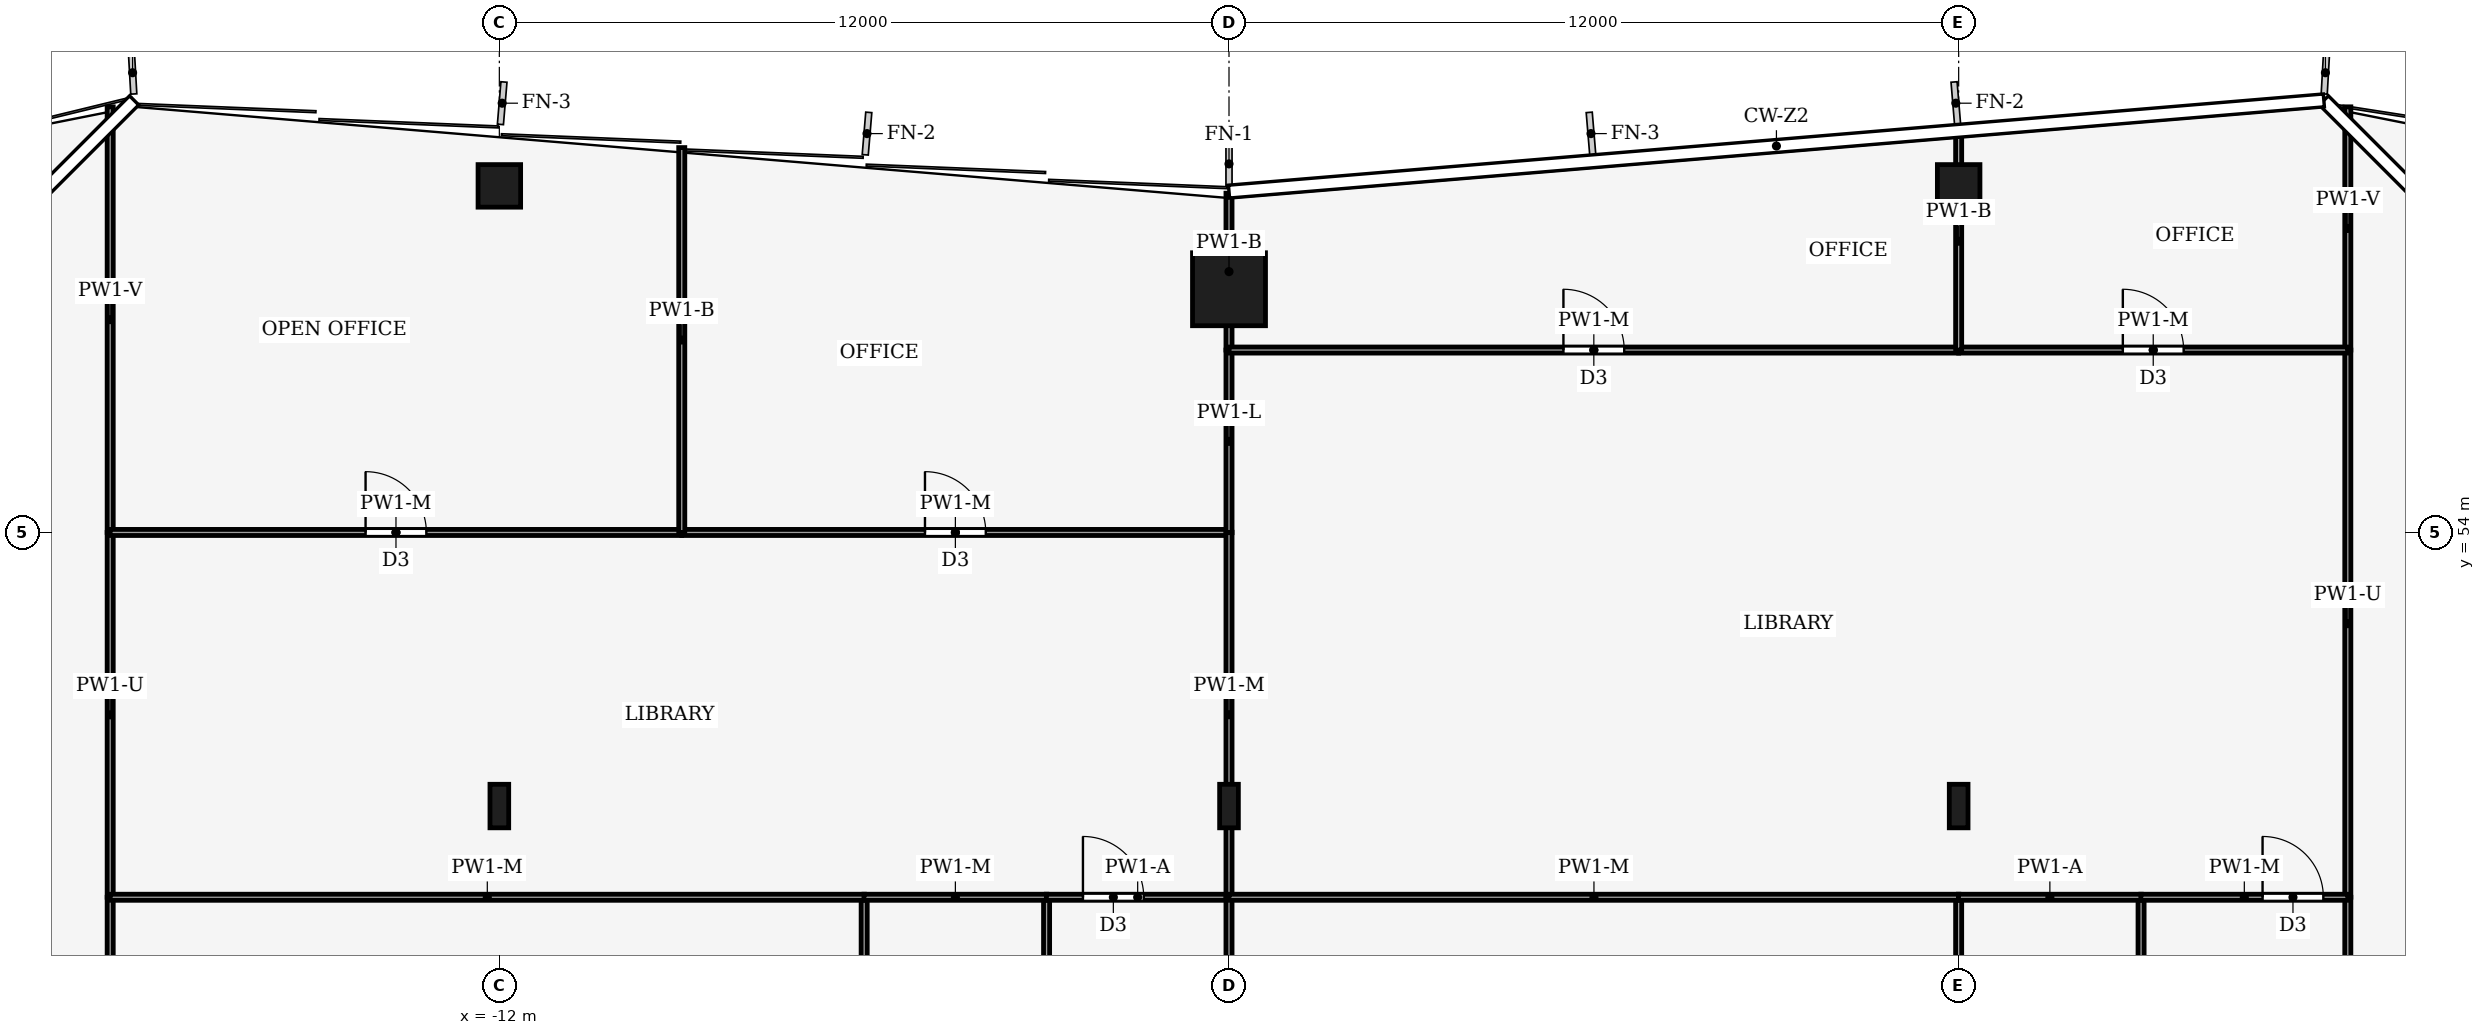
"""IFC4 building model, lengths in metres.
Left out: names, types, materials, properties, quantities, classifications, styles, units other than length and angle.
Written with IfcOpenShell. Run it as: python <this file> out.ifc"""

import sys

from ifc_helpers import new_model, si_unit, direction, frame, frame_2d, origin, origin_2d, place, context, subcontext, project, spatial, rectangle, hollow_rectangle, i_section, extrude, element, fill, save


model = new_model("IFC4")
c1 = context("Model", 3, precision=1e-05, world=origin(), true_north=direction((0.0, 1.0)))
c2 = subcontext(c1, "Body", "Model", "MODEL_VIEW")
j1 = project(units=[si_unit("LENGTHUNIT", "METRE"), si_unit("PLANEANGLEUNIT", "RADIAN")], contexts=[c1])
p1 = place(None, origin())
s1 = spatial("IfcSite", under=j1, at=p1, CompositionType="ELEMENT")
p2 = place(p1, origin())
s2 = spatial("IfcBuilding", under=s1, at=p2, CompositionType="ELEMENT")
p3 = place(p2, frame((0.0, 0.0, 121.0)))
s3 = spatial("IfcBuildingStorey", under=s2, at=p3, CompositionType="ELEMENT", Elevation=121.0)
p4 = place(p3, frame((0.0, 58.0, 0.0), z_axis=(0.0, 0.0, 1.0), x_axis=(1.0, 0.0, 0.0)))
e1 = element("IfcColumn", 1, at=p4, inside=s3, PredefinedType="COLUMN", context=c2, shape_type="SweptSolid", body=[
    extrude(hollow_rectangle(XDim=1.2, YDim=1.2, WallThickness=0.07, at=origin_2d()), origin(), (0.0, 0.0, 1.0), 5.0),
])
for number, where, z_axis, x_axis in (
    (2, (-12.0, 59.7, 0.0), (0.0, 0.0, 1.0), (1.0, 0.0, 0.0)),
    (3, (12.0, 59.7, 0.0), (0.0, 0.0, 1.0), (1.0, 0.0, 0.0)),
):
    element("IfcColumn", number, at=place(p3, frame(where, z_axis=z_axis, x_axis=x_axis)), inside=s3, PredefinedType="COLUMN", context=c2, shape_type="SweptSolid", body=[
        extrude(hollow_rectangle(XDim=0.7, YDim=0.7, WallThickness=0.03, at=origin_2d()), origin(), (0.0, 0.0, 1.0), 5.0),
    ])
for number, where, z_axis, x_axis in (
    (4, (-12.0, 49.5, 0.0), (0.0, 0.0, 1.0), (1.0, 0.0, 0.0)),
    (5, (0.0, 49.5, 0.0), (0.0, 0.0, 1.0), (1.0, 0.0, 0.0)),
    (6, (12.0, 49.5, 0.0), (0.0, 0.0, 1.0), (1.0, 0.0, 0.0)),
):
    element("IfcColumn", number, at=place(p3, frame(where, z_axis=z_axis, x_axis=x_axis)), inside=s3, PredefinedType="COLUMN", context=c2, shape_type="SweptSolid", body=[
        extrude(i_section(OverallWidth=0.308, OverallDepth=0.716, WebThickness=0.021, FlangeThickness=0.04, FilletRadius=0.027, at=origin_2d()), origin(), (0.0, 0.0, 1.0), 5.0),
    ])
p5 = place(p3, frame((-18.4, 43.4, 0.0), z_axis=(0.0, 0.0, 1.0), x_axis=(0.0, 1.0, 0.0)))
e7 = element("IfcWall", 7, at=p5, inside=s3, PredefinedType="PARTITIONING", context=c2, shape_type="SweptSolid", body=[
    extrude(rectangle(XDim=4.6, YDim=0.1, at=frame_2d((2.3, 0.0))), origin(), (0.0, 0.0, 1.0), 4.87),
])
p6 = place(p3, frame((-18.4, 48.0, 0.0), z_axis=(0.0, 0.0, 1.0), x_axis=(0.0, 1.0, 0.0)))
e8 = element("IfcWall", 8, at=p6, inside=s3, PredefinedType="PARTITIONING", context=c2, shape_type="SweptSolid", body=[
    extrude(rectangle(XDim=6.0, YDim=0.1, at=frame_2d((3.0, 0.0))), origin(), (0.0, 0.0, 1.0), 4.24),
])
p7 = place(p3, frame((-18.4, 54.0, 0.0), z_axis=(0.0, 0.0, 1.0), x_axis=(0.0, 1.0, 0.0)))
e9 = element("IfcWall", 9, at=p7, inside=s3, PredefinedType="PARTITIONING", context=c2, shape_type="SweptSolid", body=[
    extrude(rectangle(XDim=7.0, YDim=0.1, at=frame_2d((3.5, 0.0))), origin(), (0.0, 0.0, 1.0), 3.93),
])
p8 = place(p3, frame((18.4, 48.0, 0.0), z_axis=(0.0, 0.0, 1.0), x_axis=(0.0, -1.0, 0.0)))
e10 = element("IfcWall", 10, at=p8, inside=s3, PredefinedType="PARTITIONING", context=c2, shape_type="SweptSolid", body=[
    extrude(rectangle(XDim=4.6, YDim=0.1, at=frame_2d((2.3, 0.0))), origin(), (0.0, 0.0, 1.0), 4.87),
])
p9 = place(p3, frame((18.4, 57.0, 0.0), z_axis=(0.0, 0.0, 1.0), x_axis=(0.0, -1.0, 0.0)))
e11 = element("IfcWall", 11, at=p9, inside=s3, PredefinedType="PARTITIONING", context=c2, shape_type="SweptSolid", body=[
    extrude(rectangle(XDim=9.0, YDim=0.1, at=frame_2d((4.5, 0.0))), origin(), (0.0, 0.0, 1.0), 4.24),
])
p10 = place(p3, frame((18.4, 61.0, 0.0), z_axis=(0.0, 0.0, 1.0), x_axis=(0.0, -1.0, 0.0)))
e12 = element("IfcWall", 12, at=p10, inside=s3, PredefinedType="PARTITIONING", context=c2, shape_type="SweptSolid", body=[
    extrude(rectangle(XDim=4.0, YDim=0.1, at=frame_2d((2.0, 0.0))), origin(), (0.0, 0.0, 1.0), 3.93),
])
p11 = place(p3, frame((-6.0, 43.4, 0.0), z_axis=(0.0, 0.0, 1.0), x_axis=(0.0, 1.0, 0.0)))
e13 = element("IfcWall", 13, at=p11, inside=s3, PredefinedType="PARTITIONING", context=c2, shape_type="SweptSolid", body=[
    extrude(rectangle(XDim=4.6, YDim=0.1, at=frame_2d((2.3, 0.0))), origin(), (0.0, 0.0, 1.0), 4.87),
])
p12 = place(p3, frame((-5.996, 48.0, 0.0), z_axis=(0.0, 0.0, 1.0), x_axis=(-1.0, 0.0, 0.0)))
e14 = element("IfcWall", 14, at=p12, inside=s3, PredefinedType="PARTITIONING", context=c2, shape_type="SweptSolid", body=[
    extrude(rectangle(XDim=12.404, YDim=0.1, at=frame_2d((6.202, 0.0))), origin(), (0.0, 0.0, 1.0), 4.44),
])
p13 = place(p3, frame((-3.0, 43.4, 0.0), z_axis=(0.0, 0.0, 1.0), x_axis=(0.0, 1.0, 0.0)))
e15 = element("IfcWall", 15, at=p13, inside=s3, PredefinedType="PARTITIONING", context=c2, shape_type="SweptSolid", body=[
    extrude(rectangle(XDim=4.6, YDim=0.1, at=frame_2d((2.3, 0.0))), origin(), (0.0, 0.0, 1.0), 4.87),
])
p14 = place(p13, frame((2.2, 0.0, 0.0)))
e16 = element("IfcOpeningElement", 16, at=p14, cuts=e15, PredefinedType="OPENING", context=c2, shape_type="SweptSolid", body=[
    extrude(rectangle(XDim=1.0, YDim=2.1, at=frame_2d((0.5, 1.05))), frame((0.0, 0.06, 0.0), z_axis=(0.0, -1.0, 0.0), x_axis=(1.0, 0.0, 0.0)), (0.0, 0.0, 1.0), 0.12),
])
p15 = place(p3, frame((-2.996, 48.0, 0.0), z_axis=(0.0, 0.0, 1.0), x_axis=(-1.0, 0.0, 0.0)))
e17 = element("IfcWall", 17, at=p15, inside=s3, PredefinedType="PARTITIONING", context=c2, shape_type="SweptSolid", body=[
    extrude(rectangle(XDim=3.008, YDim=0.1, at=frame_2d((1.504, 0.0))), origin(), (0.0, 0.0, 1.0), 4.44),
])
p16 = place(p3, frame((-3.004, 48.0, 0.0), z_axis=(0.0, 0.0, 1.0), x_axis=(1.0, 0.0, 0.0)))
e18 = element("IfcWall", 18, at=p16, inside=s3, PredefinedType="PARTITIONING", context=c2, shape_type="SweptSolid", body=[
    extrude(rectangle(XDim=3.004, YDim=0.1, at=frame_2d((1.502, 0.0))), origin(), (0.0, 0.0, 1.0), 4.87),
])
p17 = place(p16, frame((0.602, 0.0, 0.0)))
e19 = element("IfcOpeningElement", 19, at=p17, cuts=e18, PredefinedType="OPENING", context=c2, shape_type="SweptSolid", body=[
    extrude(rectangle(XDim=1.0, YDim=2.1, at=frame_2d((0.5, 1.05))), frame((0.0, 0.06, 0.0), z_axis=(0.0, -1.0, 0.0), x_axis=(1.0, 0.0, 0.0)), (0.0, 0.0, 1.0), 0.12),
])
p18 = place(p3, frame((0.0, 43.4, 0.0), z_axis=(0.0, 0.0, 1.0), x_axis=(0.0, 1.0, 0.0)))
e20 = element("IfcWall", 20, at=p18, inside=s3, PredefinedType="PARTITIONING", context=c2, shape_type="SweptSolid", body=[
    extrude(rectangle(XDim=4.6, YDim=0.1, at=frame_2d((2.3, 0.0))), origin(), (0.0, 0.0, 1.0), 4.44),
])
p19 = place(p3, frame((-18.4, 54.0, 0.0), z_axis=(0.0, 0.0, 1.0), x_axis=(1.0, 0.0, 0.0)))
e21 = element("IfcWall", 21, at=p19, inside=s3, PredefinedType="PARTITIONING", context=c2, shape_type="SweptSolid", body=[
    extrude(rectangle(XDim=9.4, YDim=0.1, at=frame_2d((4.7, 0.0))), origin(), (0.0, 0.0, 1.0), 4.44),
])
p20 = place(p19, frame((4.2, 0.0, 0.0)))
e22 = element("IfcOpeningElement", 22, at=p20, cuts=e21, PredefinedType="OPENING", context=c2, shape_type="SweptSolid", body=[
    extrude(rectangle(XDim=1.0, YDim=2.1, at=frame_2d((0.5, 1.05))), frame((0.0, 0.06, 0.0), z_axis=(0.0, -1.0, 0.0), x_axis=(1.0, 0.0, 0.0)), (0.0, 0.0, 1.0), 0.12),
])
p21 = place(p3, frame((-9.0, 54.0, 0.0), z_axis=(0.0, 0.0, 1.0), x_axis=(1.0, 0.0, 0.0)))
e23 = element("IfcWall", 23, at=p21, inside=s3, PredefinedType="PARTITIONING", context=c2, shape_type="SweptSolid", body=[
    extrude(rectangle(XDim=9.0, YDim=0.1, at=frame_2d((4.5, 0.0))), origin(), (0.0, 0.0, 1.0), 4.44),
])
p22 = place(p21, frame((4.0, 0.0, 0.0)))
e24 = element("IfcOpeningElement", 24, at=p22, cuts=e23, PredefinedType="OPENING", context=c2, shape_type="SweptSolid", body=[
    extrude(rectangle(XDim=1.0, YDim=2.1, at=frame_2d((0.5, 1.05))), frame((0.0, 0.06, 0.0), z_axis=(0.0, -1.0, 0.0), x_axis=(1.0, 0.0, 0.0)), (0.0, 0.0, 1.0), 0.12),
])
p23 = place(p3, frame((0.0, 48.0, 0.0), z_axis=(0.0, 0.0, 1.0), x_axis=(0.0, 1.0, 0.0)))
e25 = element("IfcWall", 25, at=p23, inside=s3, PredefinedType="PARTITIONING", context=c2, shape_type="SweptSolid", body=[
    extrude(rectangle(XDim=6.004, YDim=0.1, at=frame_2d((3.002, 0.0))), origin(), (0.0, 0.0, 1.0), 4.44),
])
p24 = place(p3, frame((-9.0, 54.0, 0.0), z_axis=(0.0, 0.0, 1.0), x_axis=(0.0, 1.0, 0.0)))
e26 = element("IfcWall", 26, at=p24, inside=s3, PredefinedType="PARTITIONING", context=c2, shape_type="SweptSolid", body=[
    extrude(rectangle(XDim=6.33, YDim=0.1, at=frame_2d((3.165, 0.0))), origin(), (0.0, 0.0, 1.0), 4.04),
])
p25 = place(p3, frame((0.0, 53.996, 0.0), z_axis=(0.0, 0.0, 1.0), x_axis=(0.0, 1.0, 0.0)))
e27 = element("IfcWall", 27, at=p25, inside=s3, PredefinedType="PARTITIONING", context=c2, shape_type="SweptSolid", body=[
    extrude(rectangle(XDim=3.004, YDim=0.1, at=frame_2d((1.502, 0.0))), origin(), (0.0, 0.0, 1.0), 4.48),
])
p26 = place(p3, frame((0.0, 57.0, 0.0), z_axis=(0.0, 0.0, 1.0), x_axis=(0.0, 1.0, 0.0)))
e28 = element("IfcWall", 28, at=p26, inside=s3, PredefinedType="PARTITIONING", context=c2, shape_type="SweptSolid", body=[
    extrude(rectangle(XDim=2.58, YDim=0.1, at=frame_2d((1.29, 0.0))), origin(), (0.0, 0.0, 1.0), 4.04),
])
p27 = place(p3, frame((12.0, 43.4, 0.0), z_axis=(0.0, 0.0, 1.0), x_axis=(0.0, 1.0, 0.0)))
e29 = element("IfcWall", 29, at=p27, inside=s3, PredefinedType="PARTITIONING", context=c2, shape_type="SweptSolid", body=[
    extrude(rectangle(XDim=4.6, YDim=0.1, at=frame_2d((2.3, 0.0))), origin(), (0.0, 0.0, 1.0), 4.44),
])
p28 = place(p3, frame((12.004, 48.0, 0.0), z_axis=(0.0, 0.0, 1.0), x_axis=(-1.0, 0.0, 0.0)))
e30 = element("IfcWall", 30, at=p28, inside=s3, PredefinedType="PARTITIONING", context=c2, shape_type="SweptSolid", body=[
    extrude(rectangle(XDim=12.004, YDim=0.1, at=frame_2d((6.002, 0.0))), origin(), (0.0, 0.0, 1.0), 4.44),
])
p29 = place(p3, frame((15.0, 43.4, 0.0), z_axis=(0.0, 0.0, 1.0), x_axis=(0.0, 1.0, 0.0)))
e31 = element("IfcWall", 31, at=p29, inside=s3, PredefinedType="PARTITIONING", context=c2, shape_type="SweptSolid", body=[
    extrude(rectangle(XDim=4.6, YDim=0.1, at=frame_2d((2.3, 0.0))), origin(), (0.0, 0.0, 1.0), 4.87),
])
p30 = place(p29, frame((2.2, 0.0, 0.0)))
e32 = element("IfcOpeningElement", 32, at=p30, cuts=e31, PredefinedType="OPENING", context=c2, shape_type="SweptSolid", body=[
    extrude(rectangle(XDim=1.0, YDim=2.1, at=frame_2d((0.5, 1.05))), frame((0.0, 0.06, 0.0), z_axis=(0.0, -1.0, 0.0), x_axis=(1.0, 0.0, 0.0)), (0.0, 0.0, 1.0), 0.12),
])
p31 = place(p3, frame((15.004, 48.0, 0.0), z_axis=(0.0, 0.0, 1.0), x_axis=(-1.0, 0.0, 0.0)))
e33 = element("IfcWall", 33, at=p31, inside=s3, PredefinedType="PARTITIONING", context=c2, shape_type="SweptSolid", body=[
    extrude(rectangle(XDim=3.008, YDim=0.1, at=frame_2d((1.504, 0.0))), origin(), (0.0, 0.0, 1.0), 4.87),
])
p32 = place(p3, frame((14.996, 48.0, 0.0), z_axis=(0.0, 0.0, 1.0), x_axis=(1.0, 0.0, 0.0)))
e34 = element("IfcWall", 34, at=p32, inside=s3, PredefinedType="PARTITIONING", context=c2, shape_type="SweptSolid", body=[
    extrude(rectangle(XDim=3.404, YDim=0.1, at=frame_2d((1.702, 0.0))), origin(), (0.0, 0.0, 1.0), 4.44),
])
p33 = place(p32, frame((2.002, 0.0, 0.0)))
e35 = element("IfcOpeningElement", 35, at=p33, cuts=e34, PredefinedType="OPENING", context=c2, shape_type="SweptSolid", body=[
    extrude(rectangle(XDim=1.0, YDim=2.1, at=frame_2d((0.5, 1.05))), frame((0.0, 0.06, 0.0), z_axis=(0.0, -1.0, 0.0), x_axis=(1.0, 0.0, 0.0)), (0.0, 0.0, 1.0), 0.12),
])
p34 = place(p3, frame((0.0, 57.0, 0.0), z_axis=(0.0, 0.0, 1.0), x_axis=(1.0, 0.0, 0.0)))
e36 = element("IfcWall", 36, at=p34, inside=s3, PredefinedType="PARTITIONING", context=c2, shape_type="SweptSolid", body=[
    extrude(rectangle(XDim=12.0, YDim=0.1, at=frame_2d((6.0, 0.0))), origin(), (0.0, 0.0, 1.0), 4.44),
])
p35 = place(p34, frame((5.5, 0.0, 0.0)))
e37 = element("IfcOpeningElement", 37, at=p35, cuts=e36, PredefinedType="OPENING", context=c2, shape_type="SweptSolid", body=[
    extrude(rectangle(XDim=1.0, YDim=2.1, at=frame_2d((0.5, 1.05))), frame((0.0, 0.06, 0.0), z_axis=(0.0, -1.0, 0.0), x_axis=(1.0, 0.0, 0.0)), (0.0, 0.0, 1.0), 0.12),
])
p36 = place(p3, frame((12.0, 57.0, 0.0), z_axis=(0.0, 0.0, 1.0), x_axis=(1.0, 0.0, 0.0)))
e38 = element("IfcWall", 38, at=p36, inside=s3, PredefinedType="PARTITIONING", context=c2, shape_type="SweptSolid", body=[
    extrude(rectangle(XDim=6.4, YDim=0.1, at=frame_2d((3.2, 0.0))), origin(), (0.0, 0.0, 1.0), 4.44),
])
p37 = place(p36, frame((2.7, 0.0, 0.0)))
e39 = element("IfcOpeningElement", 39, at=p37, cuts=e38, PredefinedType="OPENING", context=c2, shape_type="SweptSolid", body=[
    extrude(rectangle(XDim=1.0, YDim=2.1, at=frame_2d((0.5, 1.05))), frame((0.0, 0.06, 0.0), z_axis=(0.0, -1.0, 0.0), x_axis=(1.0, 0.0, 0.0)), (0.0, 0.0, 1.0), 0.12),
])
p38 = place(p3, frame((12.0, 57.0, 0.0), z_axis=(0.0, 0.0, 1.0), x_axis=(0.0, 1.0, 0.0)))
e40 = element("IfcWall", 40, at=p38, inside=s3, PredefinedType="PARTITIONING", context=c2, shape_type="SweptSolid", body=[
    extrude(rectangle(XDim=3.58, YDim=0.1, at=frame_2d((1.79, 0.0))), origin(), (0.0, 0.0, 1.0), 4.04),
])
p39 = place(p17, origin())
e41 = element("IfcDoor", 41, at=p39, inside=s3, OperationType="SINGLE_SWING_LEFT", PredefinedType="DOOR", context=c2, shape_type="SweptSolid", body=[
    extrude(rectangle(XDim=1.0, YDim=2.1, at=frame_2d((0.5, 1.05))), frame((0.0, 0.025, 0.0), z_axis=(0.0, -1.0, 0.0), x_axis=(1.0, 0.0, 0.0)), (0.0, 0.0, 1.0), 0.05),
])
fill(e19, e41)
p40 = place(p20, origin())
e42 = element("IfcDoor", 42, at=p40, inside=s3, OperationType="SINGLE_SWING_RIGHT", PredefinedType="DOOR", context=c2, shape_type="SweptSolid", body=[
    extrude(rectangle(XDim=1.0, YDim=2.1, at=frame_2d((0.5, 1.05))), frame((0.0, 0.025, 0.0), z_axis=(0.0, -1.0, 0.0), x_axis=(1.0, 0.0, 0.0)), (0.0, 0.0, 1.0), 0.05),
])
fill(e22, e42)
p41 = place(p22, origin())
e43 = element("IfcDoor", 43, at=p41, inside=s3, OperationType="SINGLE_SWING_LEFT", PredefinedType="DOOR", context=c2, shape_type="SweptSolid", body=[
    extrude(rectangle(XDim=1.0, YDim=2.1, at=frame_2d((0.5, 1.05))), frame((0.0, 0.025, 0.0), z_axis=(0.0, -1.0, 0.0), x_axis=(1.0, 0.0, 0.0)), (0.0, 0.0, 1.0), 0.05),
])
fill(e24, e43)
p42 = place(p33, origin())
e44 = element("IfcDoor", 44, at=p42, inside=s3, OperationType="SINGLE_SWING_RIGHT", PredefinedType="DOOR", context=c2, shape_type="SweptSolid", body=[
    extrude(rectangle(XDim=1.0, YDim=2.1, at=frame_2d((0.5, 1.05))), frame((0.0, 0.025, 0.0), z_axis=(0.0, -1.0, 0.0), x_axis=(1.0, 0.0, 0.0)), (0.0, 0.0, 1.0), 0.05),
])
fill(e35, e44)
p43 = place(p35, origin())
e45 = element("IfcDoor", 45, at=p43, inside=s3, OperationType="SINGLE_SWING_RIGHT", PredefinedType="DOOR", context=c2, shape_type="SweptSolid", body=[
    extrude(rectangle(XDim=1.0, YDim=2.1, at=frame_2d((0.5, 1.05))), frame((0.0, 0.025, 0.0), z_axis=(0.0, -1.0, 0.0), x_axis=(1.0, 0.0, 0.0)), (0.0, 0.0, 1.0), 0.05),
])
fill(e37, e45)
p44 = place(p37, origin())
e46 = element("IfcDoor", 46, at=p44, inside=s3, OperationType="SINGLE_SWING_LEFT", PredefinedType="DOOR", context=c2, shape_type="SweptSolid", body=[
    extrude(rectangle(XDim=1.0, YDim=2.1, at=frame_2d((0.5, 1.05))), frame((0.0, 0.025, 0.0), z_axis=(0.0, -1.0, 0.0), x_axis=(1.0, 0.0, 0.0)), (0.0, 0.0, 1.0), 0.05),
])
fill(e39, e46)
save(model, sys.argv[1])
